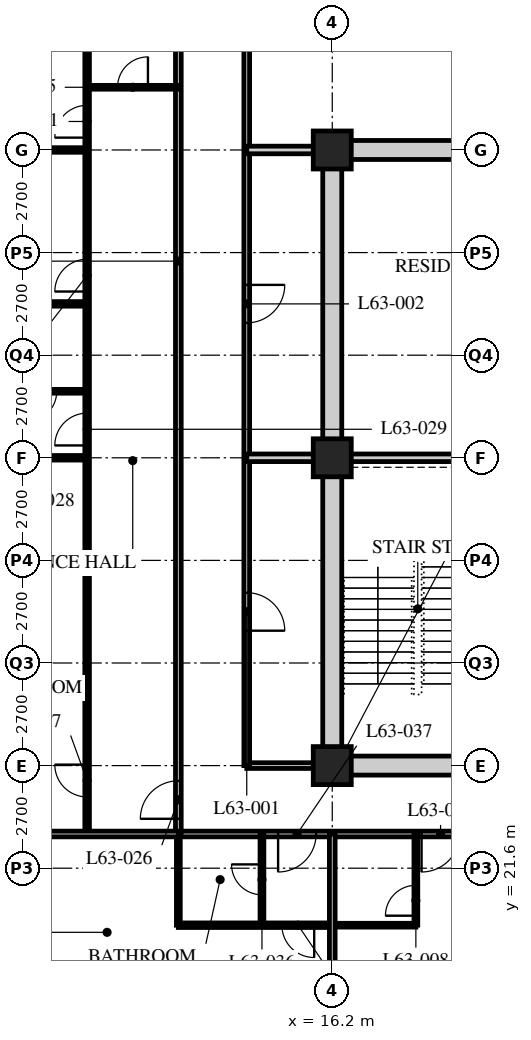
"""IFC4 building model, lengths in metres.
Left out: names, types, materials, properties, quantities, classifications, styles, units other than length and angle.
Written with IfcOpenShell. Run it as: python <this file> out.ifc"""

import sys

from ifc_helpers import new_model, si_unit, direction, frame, frame_2d, origin, origin_2d, place, context, subcontext, project, spatial, rectangle, hollow_rectangle, extrude, element, fill, save


model = new_model("IFC4")
c1 = context("Model", 3, precision=1e-05, world=origin(), true_north=direction((0.0, 1.0)))
c2 = subcontext(c1, "Body", "Model", "MODEL_VIEW")
j1 = project(units=[si_unit("LENGTHUNIT", "METRE"), si_unit("PLANEANGLEUNIT", "RADIAN")], contexts=[c1])
p1 = place(None, origin())
s1 = spatial("IfcSite", under=j1, at=p1, CompositionType="ELEMENT")
p2 = place(p1, origin())
s2 = spatial("IfcBuilding", under=s1, at=p2, CompositionType="ELEMENT")
p3 = place(p2, frame((0.0, 0.0, 246.3)))
s3 = spatial("IfcBuildingStorey", under=s2, at=p3, CompositionType="ELEMENT", Elevation=246.3)
for number, where, z_axis, x_axis in (
    (1, (16.2, 24.3, 0.0), (0.0, 0.0, 1.0), (1.0, 0.0, 0.0)),
    (2, (16.2, 32.4, 0.0), (0.0, 0.0, 1.0), (1.0, 0.0, 0.0)),
    (3, (16.2, 40.5, 0.0), (0.0, 0.0, 1.0), (1.0, 0.0, 0.0)),
):
    element("IfcColumn", number, at=place(p3, frame(where, z_axis=z_axis, x_axis=x_axis)), inside=s3, PredefinedType="COLUMN", context=c2, shape_type="SweptSolid", body=[
        extrude(hollow_rectangle(XDim=1.0, YDim=1.0, WallThickness=0.1, at=origin_2d()), origin(), (0.0, 0.0, 1.0), 3.9),
    ])
p4 = place(p3, frame((12.15, 22.5, 0.0), z_axis=(0.0, 0.0, 1.0), x_axis=(1.0, 0.0, 0.0)))
e4 = element("IfcWall", 4, at=p4, inside=s3, PredefinedType="PARTITIONING", context=c2, shape_type="SweptSolid", body=[
    extrude(rectangle(XDim=24.3, YDim=0.15, at=frame_2d((12.15, 0.0))), origin(), (0.0, 0.0, 1.0), 3.69),
])
p5 = place(p4, frame((6.4, 0.0, 0.0)))
e5 = element("IfcOpeningElement", 5, at=p5, cuts=e4, PredefinedType="OPENING", context=c2, shape_type="SweptSolid", body=[
    extrude(rectangle(XDim=1.0, YDim=2.1, at=frame_2d((0.5, 1.05))), frame((0.0, 0.085, 0.0), z_axis=(0.0, -1.0, 0.0), x_axis=(1.0, 0.0, 0.0)), (0.0, 0.0, 1.0), 0.17),
])
p6 = place(p4, frame((8.5, 0.0, 0.0)))
e6 = element("IfcOpeningElement", 6, at=p6, cuts=e4, PredefinedType="OPENING", context=c2, shape_type="SweptSolid", body=[
    extrude(rectangle(XDim=1.0, YDim=2.1, at=frame_2d((0.5, 1.05))), frame((0.0, 0.085, 0.0), z_axis=(0.0, -1.0, 0.0), x_axis=(1.0, 0.0, 0.0)), (0.0, 0.0, 1.0), 0.17),
])
p7 = place(p4, frame((16.6, 0.0, 0.0)))
e7 = element("IfcOpeningElement", 7, at=p7, cuts=e4, PredefinedType="OPENING", context=c2, shape_type="SweptSolid", body=[
    extrude(rectangle(XDim=1.0, YDim=2.1, at=frame_2d((0.5, 1.05))), frame((0.0, 0.085, 0.0), z_axis=(0.0, -1.0, 0.0), x_axis=(1.0, 0.0, 0.0)), (0.0, 0.0, 1.0), 0.17),
])
p8 = place(p4, frame((2.625, 0.0, 0.0)))
e8 = element("IfcOpeningElement", 8, at=p8, cuts=e4, PredefinedType="OPENING", context=c2, shape_type="SweptSolid", body=[
    extrude(rectangle(XDim=1.0, YDim=2.1, at=frame_2d((0.5, 1.05))), frame((0.0, 0.085, 0.0), z_axis=(0.0, -1.0, 0.0), x_axis=(1.0, 0.0, 0.0)), (0.0, 0.0, 1.0), 0.17),
])
p9 = place(p3, frame((12.15, 22.5, 0.0), z_axis=(0.0, 0.0, 1.0), x_axis=(0.0, 1.0, 0.0)))
e9 = element("IfcWall", 9, at=p9, inside=s3, PredefinedType="PARTITIONING", context=c2, shape_type="SweptSolid", body=[
    extrude(rectangle(XDim=30.15, YDim=0.15, at=frame_2d((15.075, 0.0))), origin(), (0.0, 0.0, 1.0), 3.69),
])
p10 = place(p9, frame((0.4, 0.0, 0.0)))
e10 = element("IfcOpeningElement", 10, at=p10, cuts=e9, PredefinedType="OPENING", context=c2, shape_type="SweptSolid", body=[
    extrude(rectangle(XDim=1.0, YDim=2.1, at=frame_2d((0.5, 1.05))), frame((0.0, 0.085, 0.0), z_axis=(0.0, -1.0, 0.0), x_axis=(1.0, 0.0, 0.0)), (0.0, 0.0, 1.0), 0.17),
])
p11 = place(p9, frame((24.4, 0.0, 0.0)))
e11 = element("IfcOpeningElement", 11, at=p11, cuts=e9, PredefinedType="OPENING", context=c2, shape_type="SweptSolid", body=[
    extrude(rectangle(XDim=1.0, YDim=2.1, at=frame_2d((0.5, 1.05))), frame((0.0, 0.085, 0.0), z_axis=(0.0, -1.0, 0.0), x_axis=(1.0, 0.0, 0.0)), (0.0, 0.0, 1.0), 0.17),
])
p12 = place(p9, frame((28.45, 0.0, 0.0)))
e12 = element("IfcOpeningElement", 12, at=p12, cuts=e9, PredefinedType="OPENING", context=c2, shape_type="SweptSolid", body=[
    extrude(rectangle(XDim=1.0, YDim=2.1, at=frame_2d((0.5, 1.05))), frame((0.0, 0.085, 0.0), z_axis=(0.0, -1.0, 0.0), x_axis=(1.0, 0.0, 0.0)), (0.0, 0.0, 1.0), 0.17),
])
p13 = place(p3, frame((16.0, 24.3, 0.0), z_axis=(0.0, 0.0, 1.0), x_axis=(-1.0, 0.0, 0.0)))
e13 = element("IfcWall", 13, at=p13, inside=s3, PredefinedType="PARTITIONING", context=c2, shape_type="SweptSolid", body=[
    extrude(rectangle(XDim=2.05, YDim=0.15, at=frame_2d((1.025, 0.0))), origin(), (0.0, 0.0, 1.0), 3.078),
])
p14 = place(p3, frame((13.95, 24.3, 0.0), z_axis=(0.0, 0.0, 1.0), x_axis=(0.0, 1.0, 0.0)))
e14 = element("IfcWall", 14, at=p14, inside=s3, PredefinedType="PARTITIONING", context=c2, shape_type="SweptSolid", body=[
    extrude(rectangle(XDim=26.55, YDim=0.15, at=frame_2d((13.275, 0.0))), origin(), (0.0, 0.0, 1.0), 3.69),
])
p15 = place(p14, frame((3.55, 0.0, 0.0)))
e15 = element("IfcOpeningElement", 15, at=p15, cuts=e14, PredefinedType="OPENING", context=c2, shape_type="SweptSolid", body=[
    extrude(rectangle(XDim=1.0, YDim=2.1, at=frame_2d((0.5, 1.05))), frame((0.0, 0.085, 0.0), z_axis=(0.0, -1.0, 0.0), x_axis=(1.0, 0.0, 0.0)), (0.0, 0.0, 1.0), 0.17),
])
p16 = place(p14, frame((11.65, 0.0, 0.0)))
e16 = element("IfcOpeningElement", 16, at=p16, cuts=e14, PredefinedType="OPENING", context=c2, shape_type="SweptSolid", body=[
    extrude(rectangle(XDim=1.0, YDim=2.1, at=frame_2d((0.5, 1.05))), frame((0.0, 0.085, 0.0), z_axis=(0.0, -1.0, 0.0), x_axis=(1.0, 0.0, 0.0)), (0.0, 0.0, 1.0), 0.17),
])
for number, where, z_axis, x_axis in (
    (17, (13.95, 32.4, 0.0), (0.0, 0.0, 1.0), (1.0, 0.0, 0.0)),
    (18, (13.95, 40.5, 0.0), (0.0, 0.0, 1.0), (1.0, 0.0, 0.0)),
):
    element("IfcWall", number, at=place(p3, frame(where, z_axis=z_axis, x_axis=x_axis)), inside=s3, PredefinedType="SOLIDWALL", context=c2, shape_type="SweptSolid", body=[
        extrude(rectangle(XDim=2.25, YDim=0.2, at=frame_2d((1.125, 0.0))), origin(), (0.0, 0.0, 1.0), 3.078),
    ])
p17 = place(p3, frame((16.2, 20.1, 0.0), z_axis=(0.0, 0.0, 1.0), x_axis=(1.0, 0.0, 0.0)))
e19 = element("IfcWall", 19, at=p17, inside=s3, PredefinedType="PARTITIONING", context=c2, shape_type="SweptSolid", body=[
    extrude(rectangle(XDim=2.2, YDim=0.1, at=frame_2d((1.1, 0.0))), origin(), (0.0, 0.0, 1.0), 3.69),
])
p18 = place(p3, frame((18.4, 22.5, 0.0), z_axis=(0.0, 0.0, 1.0), x_axis=(0.0, -1.0, 0.0)))
e20 = element("IfcWall", 20, at=p18, inside=s3, PredefinedType="PARTITIONING", context=c2, shape_type="SweptSolid", body=[
    extrude(rectangle(XDim=2.4, YDim=0.1, at=frame_2d((1.2, 0.0))), origin(), (0.0, 0.0, 1.0), 3.69),
])
p19 = place(p18, frame((1.35, 0.0, 0.0)))
e21 = element("IfcOpeningElement", 21, at=p19, cuts=e20, PredefinedType="OPENING", context=c2, shape_type="SweptSolid", body=[
    extrude(rectangle(XDim=0.8, YDim=2.1, at=frame_2d((0.4, 1.05))), frame((0.0, 0.06, 0.0), z_axis=(0.0, -1.0, 0.0), x_axis=(1.0, 0.0, 0.0)), (0.0, 0.0, 1.0), 0.12),
])
p20 = place(p3, frame((9.75, 22.5, 0.0), z_axis=(0.0, 0.0, 1.0), x_axis=(0.0, 1.0, 0.0)))
e22 = element("IfcWall", 22, at=p20, inside=s3, PredefinedType="PARTITIONING", context=c2, shape_type="SweptSolid", body=[
    extrude(rectangle(XDim=22.05, YDim=0.12, at=frame_2d((11.025, 0.0))), origin(), (0.0, 0.0, 1.0), 3.69),
])
p21 = place(p20, frame((0.975, 0.0, 0.0)))
e23 = element("IfcOpeningElement", 23, at=p21, cuts=e22, PredefinedType="OPENING", context=c2, shape_type="SweptSolid", body=[
    extrude(rectangle(XDim=0.85, YDim=2.1, at=frame_2d((0.425, 1.05))), frame((0.0, 0.07, 0.0), z_axis=(0.0, -1.0, 0.0), x_axis=(1.0, 0.0, 0.0)), (0.0, 0.0, 1.0), 0.14),
])
p22 = place(p20, frame((10.225, 0.0, 0.0)))
e24 = element("IfcOpeningElement", 24, at=p22, cuts=e22, PredefinedType="OPENING", context=c2, shape_type="SweptSolid", body=[
    extrude(rectangle(XDim=0.85, YDim=2.1, at=frame_2d((0.425, 1.05))), frame((0.0, 0.07, 0.0), z_axis=(0.0, -1.0, 0.0), x_axis=(1.0, 0.0, 0.0)), (0.0, 0.0, 1.0), 0.14),
])
p23 = place(p20, frame((14.275, 0.0, 0.0)))
e25 = element("IfcOpeningElement", 25, at=p23, cuts=e22, PredefinedType="OPENING", context=c2, shape_type="SweptSolid", body=[
    extrude(rectangle(XDim=0.85, YDim=2.1, at=frame_2d((0.425, 1.05))), frame((0.0, 0.07, 0.0), z_axis=(0.0, -1.0, 0.0), x_axis=(1.0, 0.0, 0.0)), (0.0, 0.0, 1.0), 0.14),
])
p24 = place(p20, frame((18.325, 0.0, 0.0)))
e26 = element("IfcOpeningElement", 26, at=p24, cuts=e22, PredefinedType="OPENING", context=c2, shape_type="SweptSolid", body=[
    extrude(rectangle(XDim=0.85, YDim=2.1, at=frame_2d((0.425, 1.05))), frame((0.0, 0.07, 0.0), z_axis=(0.0, -1.0, 0.0), x_axis=(1.0, 0.0, 0.0)), (0.0, 0.0, 1.0), 0.14),
])
p25 = place(p3, frame((12.15, 42.15, 0.0), z_axis=(0.0, 0.0, 1.0), x_axis=(-1.0, 0.0, 0.0)))
e27 = element("IfcWall", 27, at=p25, inside=s3, PredefinedType="PARTITIONING", context=c2, shape_type="SweptSolid", body=[
    extrude(rectangle(XDim=2.4, YDim=0.1, at=frame_2d((1.2, 0.0))), origin(), (0.0, 0.0, 1.0), 3.69),
])
p26 = place(p25, frame((0.8, 0.0, 0.0)))
e28 = element("IfcOpeningElement", 28, at=p26, cuts=e27, PredefinedType="OPENING", context=c2, shape_type="SweptSolid", body=[
    extrude(rectangle(XDim=0.8, YDim=2.1, at=frame_2d((0.4, 1.05))), frame((0.0, 0.06, 0.0), z_axis=(0.0, -1.0, 0.0), x_axis=(1.0, 0.0, 0.0)), (0.0, 0.0, 1.0), 0.12),
])
p27 = place(p3, frame((9.75, 34.15, 0.0), z_axis=(0.0, 0.0, 1.0), x_axis=(-1.0, 0.0, 0.0)))
e29 = element("IfcWall", 29, at=p27, inside=s3, PredefinedType="PARTITIONING", context=c2, shape_type="SweptSolid", body=[
    extrude(rectangle(XDim=2.4, YDim=0.1, at=frame_2d((1.2, 0.0))), origin(), (0.0, 0.0, 1.0), 3.69),
])
p28 = place(p27, frame((0.8, 0.0, 0.0)))
e30 = element("IfcOpeningElement", 30, at=p28, cuts=e29, PredefinedType="OPENING", context=c2, shape_type="SweptSolid", body=[
    extrude(rectangle(XDim=0.8, YDim=2.1, at=frame_2d((0.4, 1.05))), frame((0.0, 0.06, 0.0), z_axis=(0.0, -1.0, 0.0), x_axis=(1.0, 0.0, 0.0)), (0.0, 0.0, 1.0), 0.12),
])
p29 = place(p3, frame((9.75, 32.4, 0.0), z_axis=(0.0, 0.0, 1.0), x_axis=(-1.0, 0.0, 0.0)))
e31 = element("IfcWall", 31, at=p29, inside=s3, PredefinedType="PARTITIONING", context=c2, shape_type="SweptSolid", body=[
    extrude(rectangle(XDim=9.45, YDim=0.12, at=frame_2d((4.725, 0.0))), origin(), (0.0, 0.0, 1.0), 3.078),
])
p30 = place(p3, frame((9.75, 36.45, 0.0), z_axis=(0.0, 0.0, 1.0), x_axis=(-1.0, 0.0, 0.0)))
e32 = element("IfcWall", 32, at=p30, inside=s3, PredefinedType="PARTITIONING", context=c2, shape_type="SweptSolid", body=[
    extrude(rectangle(XDim=9.45, YDim=0.12, at=frame_2d((4.725, 0.0))), origin(), (0.0, 0.0, 1.0), 3.69),
])
p31 = place(p3, frame((9.75, 40.5, 0.0), z_axis=(0.0, 0.0, 1.0), x_axis=(-1.0, 0.0, 0.0)))
e33 = element("IfcWall", 33, at=p31, inside=s3, PredefinedType="PARTITIONING", context=c2, shape_type="SweptSolid", body=[
    extrude(rectangle(XDim=9.45, YDim=0.12, at=frame_2d((4.725, 0.0))), origin(), (0.0, 0.0, 1.0), 3.078),
])
p32 = place(p3, frame((12.15, 20.1, 0.0), z_axis=(0.0, 0.0, 1.0), x_axis=(1.0, 0.0, 0.0)))
e34 = element("IfcWall", 34, at=p32, inside=s3, PredefinedType="PARTITIONING", context=c2, shape_type="SweptSolid", body=[
    extrude(rectangle(XDim=4.05, YDim=0.12, at=frame_2d((2.025, 0.0))), origin(), (0.0, 0.0, 1.0), 3.69),
])
p33 = place(p32, frame((2.725, 0.0, 0.0)))
e35 = element("IfcOpeningElement", 35, at=p33, cuts=e34, PredefinedType="OPENING", context=c2, shape_type="SweptSolid", body=[
    extrude(rectangle(XDim=0.85, YDim=2.1, at=frame_2d((0.425, 1.05))), frame((0.0, 0.07, 0.0), z_axis=(0.0, -1.0, 0.0), x_axis=(1.0, 0.0, 0.0)), (0.0, 0.0, 1.0), 0.14),
])
p34 = place(p3, frame((14.35, 22.5, 0.0), z_axis=(0.0, 0.0, 1.0), x_axis=(0.0, -1.0, 0.0)))
e36 = element("IfcWall", 36, at=p34, inside=s3, PredefinedType="PARTITIONING", context=c2, shape_type="SweptSolid", body=[
    extrude(rectangle(XDim=2.4, YDim=0.1, at=frame_2d((1.2, 0.0))), origin(), (0.0, 0.0, 1.0), 3.69),
])
p35 = place(p34, frame((0.8, 0.0, 0.0)))
e37 = element("IfcOpeningElement", 37, at=p35, cuts=e36, PredefinedType="OPENING", context=c2, shape_type="SweptSolid", body=[
    extrude(rectangle(XDim=0.8, YDim=2.1, at=frame_2d((0.4, 1.05))), frame((0.0, 0.06, 0.0), z_axis=(0.0, -1.0, 0.0), x_axis=(1.0, 0.0, 0.0)), (0.0, 0.0, 1.0), 0.12),
])
p36 = place(p3, frame((12.15, 22.5, 0.0), z_axis=(0.0, 0.0, 1.0), x_axis=(0.0, -1.0, 0.0)))
e38 = element("IfcWall", 38, at=p36, inside=s3, PredefinedType="PARTITIONING", context=c2, shape_type="SweptSolid", body=[
    extrude(rectangle(XDim=2.4, YDim=0.1, at=frame_2d((1.2, 0.0))), origin(), (0.0, 0.0, 1.0), 3.69),
])
p37 = place(p3, frame((4.35, 22.5, 0.0), z_axis=(0.0, 0.0, 1.0), x_axis=(1.0, 0.0, 0.0)))
e39 = element("IfcWall", 39, at=p37, inside=s3, PredefinedType="PARTITIONING", context=c2, shape_type="SweptSolid", body=[
    extrude(rectangle(XDim=7.8, YDim=0.15, at=frame_2d((3.9, 0.0))), origin(), (0.0, 0.0, 1.0), 3.69),
])
p38 = place(p3, frame((16.2, 22.5, 0.0), z_axis=(0.0, 0.0, 1.0), x_axis=(0.0, -1.0, 0.0)))
e40 = element("IfcWall", 40, at=p38, inside=s3, PredefinedType="PARTITIONING", context=c2, shape_type="SweptSolid", body=[
    extrude(rectangle(XDim=6.0, YDim=0.15, at=frame_2d((3.0, 0.0))), origin(), (0.0, 0.0, 1.0), 3.078),
])
p39 = place(p3, frame((15.95, 24.3, 0.0), z_axis=(0.0, 0.0, 1.0), x_axis=(1.0, 0.0, 0.0)))
e41 = element("IfcWall", 41, at=p39, inside=s3, PredefinedType="SOLIDWALL", context=c2, shape_type="SweptSolid", body=[
    extrude(rectangle(XDim=24.55, YDim=0.5, at=frame_2d((12.275, 0.0))), origin(), (0.0, 0.0, 1.0), 3.04),
])
p40 = place(p39, frame((11.5, 0.0, 0.0)))
e42 = element("IfcOpeningElement", 42, at=p40, cuts=e41, PredefinedType="OPENING", context=c2, shape_type="SweptSolid", body=[
    extrude(rectangle(XDim=1.8, YDim=2.4, at=frame_2d((0.9, 1.2))), frame((0.0, 0.26, 0.0), z_axis=(0.0, -1.0, 0.0), x_axis=(1.0, 0.0, 0.0)), (0.0, 0.0, 1.0), 0.52),
])
p41 = place(p3, frame((15.95, 40.5, 0.0), z_axis=(0.0, 0.0, 1.0), x_axis=(1.0, 0.0, 0.0)))
e43 = element("IfcWall", 43, at=p41, inside=s3, PredefinedType="SOLIDWALL", context=c2, shape_type="SweptSolid", body=[
    extrude(rectangle(XDim=24.55, YDim=0.5, at=frame_2d((12.275, 0.0))), origin(), (0.0, 0.0, 1.0), 3.04),
])
p42 = place(p41, frame((11.5, 0.0, 0.0)))
e44 = element("IfcOpeningElement", 44, at=p42, cuts=e43, PredefinedType="OPENING", context=c2, shape_type="SweptSolid", body=[
    extrude(rectangle(XDim=1.8, YDim=2.4, at=frame_2d((0.9, 1.2))), frame((0.0, 0.26, 0.0), z_axis=(0.0, -1.0, 0.0), x_axis=(1.0, 0.0, 0.0)), (0.0, 0.0, 1.0), 0.52),
])
p43 = place(p3, frame((16.2, 24.55, 0.0), z_axis=(0.0, 0.0, 1.0), x_axis=(0.0, 1.0, 0.0)))
e45 = element("IfcWall", 45, at=p43, inside=s3, PredefinedType="SOLIDWALL", context=c2, shape_type="SweptSolid", body=[
    extrude(rectangle(XDim=15.7, YDim=0.5, at=frame_2d((7.85, 0.0))), origin(), (0.0, 0.0, 1.0), 3.078),
])
p44 = place(p3, frame((16.45, 32.4, 0.0), z_axis=(0.0, 0.0, 1.0), x_axis=(1.0, 0.0, 0.0)))
e46 = element("IfcWall", 46, at=p44, inside=s3, PredefinedType="SOLIDWALL", context=c2, shape_type="SweptSolid", body=[
    extrude(rectangle(XDim=7.95, YDim=0.2, at=frame_2d((3.975, 0.0))), origin(), (0.0, 0.0, 1.0), 3.078),
])
p45 = place(p15, origin())
e47 = element("IfcDoor", 47, at=p45, inside=s3, OperationType="SINGLE_SWING_RIGHT", PredefinedType="DOOR", context=c2, shape_type="SweptSolid", body=[
    extrude(rectangle(XDim=1.0, YDim=2.1, at=frame_2d((0.5, 1.05))), frame((0.0, 0.025, 0.0), z_axis=(0.0, -1.0, 0.0), x_axis=(1.0, 0.0, 0.0)), (0.0, 0.0, 1.0), 0.05),
])
fill(e15, e47)
p46 = place(p16, origin())
e48 = element("IfcDoor", 48, at=p46, inside=s3, OperationType="SINGLE_SWING_LEFT", PredefinedType="DOOR", context=c2, shape_type="SweptSolid", body=[
    extrude(rectangle(XDim=1.0, YDim=2.1, at=frame_2d((0.5, 1.05))), frame((0.0, 0.025, 0.0), z_axis=(0.0, -1.0, 0.0), x_axis=(1.0, 0.0, 0.0)), (0.0, 0.0, 1.0), 0.05),
])
fill(e16, e48)
p47 = place(p19, origin())
e49 = element("IfcDoor", 49, at=p47, inside=s3, OperationType="SINGLE_SWING_LEFT", PredefinedType="DOOR", context=c2, shape_type="SweptSolid", body=[
    extrude(rectangle(XDim=0.8, YDim=2.1, at=frame_2d((0.4, 1.05))), frame((0.0, 0.025, 0.0), z_axis=(0.0, -1.0, 0.0), x_axis=(1.0, 0.0, 0.0)), (0.0, 0.0, 1.0), 0.05),
])
fill(e21, e49)
p48 = place(p5, origin())
e50 = element("IfcDoor", 50, at=p48, inside=s3, OperationType="SINGLE_SWING_RIGHT", PredefinedType="DOOR", context=c2, shape_type="SweptSolid", body=[
    extrude(rectangle(XDim=1.0, YDim=2.1, at=frame_2d((0.5, 1.05))), frame((0.0, 0.025, 0.0), z_axis=(0.0, -1.0, 0.0), x_axis=(1.0, 0.0, 0.0)), (0.0, 0.0, 1.0), 0.05),
])
fill(e5, e50)
p49 = place(p26, origin())
e51 = element("IfcDoor", 51, at=p49, inside=s3, OperationType="SINGLE_SWING_RIGHT", PredefinedType="DOOR", context=c2, shape_type="SweptSolid", body=[
    extrude(rectangle(XDim=0.8, YDim=2.1, at=frame_2d((0.4, 1.05))), frame((0.0, 0.025, 0.0), z_axis=(0.0, -1.0, 0.0), x_axis=(1.0, 0.0, 0.0)), (0.0, 0.0, 1.0), 0.05),
])
fill(e28, e51)
p50 = place(p10, origin())
e52 = element("IfcDoor", 52, at=p50, inside=s3, OperationType="SINGLE_SWING_LEFT", PredefinedType="DOOR", context=c2, shape_type="SweptSolid", body=[
    extrude(rectangle(XDim=1.0, YDim=2.1, at=frame_2d((0.5, 1.05))), frame((0.0, 0.025, 0.0), z_axis=(0.0, -1.0, 0.0), x_axis=(1.0, 0.0, 0.0)), (0.0, 0.0, 1.0), 0.05),
])
fill(e10, e52)
p51 = place(p21, origin())
e53 = element("IfcDoor", 53, at=p51, inside=s3, OperationType="SINGLE_SWING_RIGHT", PredefinedType="DOOR", context=c2, shape_type="SweptSolid", body=[
    extrude(rectangle(XDim=0.85, YDim=2.1, at=frame_2d((0.425, 1.05))), frame((0.0, 0.025, 0.0), z_axis=(0.0, -1.0, 0.0), x_axis=(1.0, 0.0, 0.0)), (0.0, 0.0, 1.0), 0.05),
])
fill(e23, e53)
p52 = place(p28, origin())
e54 = element("IfcDoor", 54, at=p52, inside=s3, OperationType="SINGLE_SWING_RIGHT", PredefinedType="DOOR", context=c2, shape_type="SweptSolid", body=[
    extrude(rectangle(XDim=0.8, YDim=2.1, at=frame_2d((0.4, 1.05))), frame((0.0, 0.025, 0.0), z_axis=(0.0, -1.0, 0.0), x_axis=(1.0, 0.0, 0.0)), (0.0, 0.0, 1.0), 0.05),
])
fill(e30, e54)
p53 = place(p22, origin())
e55 = element("IfcDoor", 55, at=p53, inside=s3, OperationType="SINGLE_SWING_LEFT", PredefinedType="DOOR", context=c2, shape_type="SweptSolid", body=[
    extrude(rectangle(XDim=0.85, YDim=2.1, at=frame_2d((0.425, 1.05))), frame((0.0, 0.025, 0.0), z_axis=(0.0, -1.0, 0.0), x_axis=(1.0, 0.0, 0.0)), (0.0, 0.0, 1.0), 0.05),
])
fill(e24, e55)
p54 = place(p23, origin())
e56 = element("IfcDoor", 56, at=p54, inside=s3, OperationType="SINGLE_SWING_LEFT", PredefinedType="DOOR", context=c2, shape_type="SweptSolid", body=[
    extrude(rectangle(XDim=0.85, YDim=2.1, at=frame_2d((0.425, 1.05))), frame((0.0, 0.025, 0.0), z_axis=(0.0, -1.0, 0.0), x_axis=(1.0, 0.0, 0.0)), (0.0, 0.0, 1.0), 0.05),
])
fill(e25, e56)
p55 = place(p24, origin())
e57 = element("IfcDoor", 57, at=p55, inside=s3, OperationType="SINGLE_SWING_LEFT", PredefinedType="DOOR", context=c2, shape_type="SweptSolid", body=[
    extrude(rectangle(XDim=0.85, YDim=2.1, at=frame_2d((0.425, 1.05))), frame((0.0, 0.025, 0.0), z_axis=(0.0, -1.0, 0.0), x_axis=(1.0, 0.0, 0.0)), (0.0, 0.0, 1.0), 0.05),
])
fill(e26, e57)
p56 = place(p35, origin())
e58 = element("IfcDoor", 58, at=p56, inside=s3, OperationType="SINGLE_SWING_RIGHT", PredefinedType="DOOR", context=c2, shape_type="SweptSolid", body=[
    extrude(rectangle(XDim=0.8, YDim=2.1, at=frame_2d((0.4, 1.05))), frame((0.0, 0.025, 0.0), z_axis=(0.0, -1.0, 0.0), x_axis=(1.0, 0.0, 0.0)), (0.0, 0.0, 1.0), 0.05),
])
fill(e37, e58)
p57 = place(p8, origin())
e59 = element("IfcDoor", 59, at=p57, inside=s3, OperationType="SINGLE_SWING_RIGHT", PredefinedType="DOOR", context=c2, shape_type="SweptSolid", body=[
    extrude(rectangle(XDim=1.0, YDim=2.1, at=frame_2d((0.5, 1.05))), frame((0.0, 0.025, 0.0), z_axis=(0.0, -1.0, 0.0), x_axis=(1.0, 0.0, 0.0)), (0.0, 0.0, 1.0), 0.05),
])
fill(e8, e59)
p58 = place(p33, origin())
e60 = element("IfcDoor", 60, at=p58, inside=s3, OperationType="SINGLE_SWING_LEFT", PredefinedType="DOOR", context=c2, shape_type="SweptSolid", body=[
    extrude(rectangle(XDim=0.85, YDim=2.1, at=frame_2d((0.425, 1.05))), frame((0.0, 0.025, 0.0), z_axis=(0.0, -1.0, 0.0), x_axis=(1.0, 0.0, 0.0)), (0.0, 0.0, 1.0), 0.05),
])
fill(e35, e60)
save(model, sys.argv[1])
